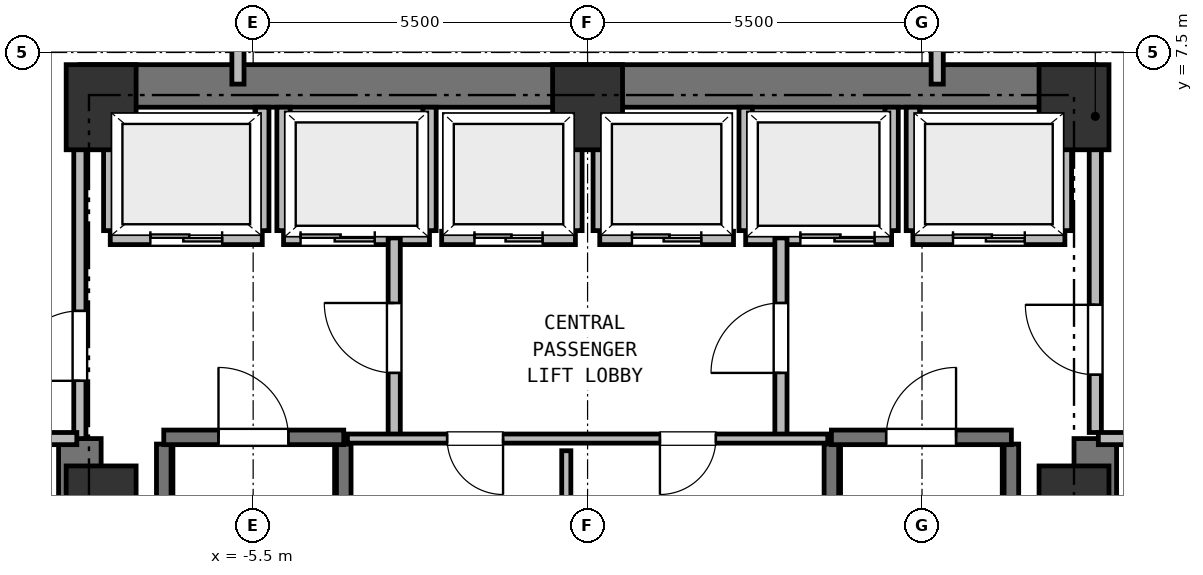
"""IFC4 building model, lengths in metres.
Left out: names, types, materials, properties, quantities, classifications, styles, units other than length and angle.
Written with IfcOpenShell. Run it as: python <this file> out.ifc"""

import sys

from ifc_helpers import new_model, si_unit, direction, frame, frame_2d, origin, origin_2d, place, context, subcontext, project, spatial, rectangle, extrude, element, fill, save


model = new_model("IFC4")
c1 = context("Model", 3, precision=1e-05, world=origin(), true_north=direction((0.0, 1.0)))
c2 = subcontext(c1, "Body", "Model", "MODEL_VIEW")
j1 = project(units=[si_unit("LENGTHUNIT", "METRE"), si_unit("PLANEANGLEUNIT", "RADIAN")], contexts=[c1])
p1 = place(None, origin())
s1 = spatial("IfcSite", under=j1, at=p1, CompositionType="ELEMENT")
p2 = place(p1, origin())
s2 = spatial("IfcBuilding", under=s1, at=p2, CompositionType="ELEMENT")
p3 = place(p2, origin())
s3 = spatial("IfcBuildingStorey", under=s2, at=p3, CompositionType="ELEMENT", Elevation=0.0)
for number, where, z_axis, x_axis in (
    (1, (8.0, 0.0, 0.0), (0.0, 0.0, 1.0), (1.0, 0.0, 0.0)),
    (2, (8.0, 6.6, 0.0), (0.0, 0.0, 1.0), (1.0, 0.0, 0.0)),
    (3, (0.0, 6.6, 0.0), (0.0, 0.0, 1.0), (1.0, 0.0, 0.0)),
    (4, (-8.0, 6.6, 0.0), (0.0, 0.0, 1.0), (1.0, 0.0, 0.0)),
    (5, (-8.0, 0.0, 0.0), (0.0, 0.0, 1.0), (1.0, 0.0, 0.0)),
):
    element("IfcColumn", number, at=place(p3, frame(where, z_axis=z_axis, x_axis=x_axis)), inside=s3, PredefinedType="COLUMN", context=c2, shape_type="SweptSolid", body=[
        extrude(rectangle(XDim=1.15, YDim=1.4, at=origin_2d()), origin(), (0.0, 0.0, 1.0), 6.0),
    ])
p4 = place(p3, frame((-8.35, 6.95, 0.0), z_axis=(0.0, 0.0, 1.0), x_axis=(1.0, 0.0, 0.0)))
e6 = element("IfcWall", 6, at=p4, inside=s3, PredefinedType="SHEAR", context=c2, shape_type="SweptSolid", body=[
    extrude(rectangle(XDim=16.7, YDim=0.7, at=frame_2d((8.35, 0.0))), origin(), (0.0, 0.0, 1.0), 5.72),
])
for number, where, z_axis, x_axis in (
    (7, (-8.35, -6.95, 0.0), (0.0, 0.0, 1.0), (0.0, 1.0, 0.0)),
    (8, (8.35, -6.95, 0.0), (0.0, 0.0, 1.0), (0.0, 1.0, 0.0)),
):
    element("IfcWall", number, at=place(p3, frame(where, z_axis=z_axis, x_axis=x_axis)), inside=s3, PredefinedType="SHEAR", context=c2, shape_type="SweptSolid", body=[
        extrude(rectangle(XDim=8.1, YDim=0.7, at=frame_2d((4.05, 0.0))), origin(), (0.0, 0.0, 1.0), 5.72),
    ])
for number, where, z_axis, x_axis in (
    (9, (-6.97, -6.16, 0.0), (0.0, 0.0, 1.0), (0.0, 1.0, 0.0)),
    (10, (-4.01, -6.16, 0.0), (0.0, 0.0, 1.0), (0.0, 1.0, 0.0)),
):
    element("IfcWall", number, at=place(p3, frame(where, z_axis=z_axis, x_axis=x_axis)), inside=s3, PredefinedType="SHEAR", context=c2, shape_type="SweptSolid", body=[
        extrude(rectangle(XDim=7.22, YDim=0.24, at=frame_2d((3.61, 0.0))), origin(), (0.0, 0.0, 1.0), 5.72),
    ])
p5 = place(p3, frame((-6.97, 1.17, 0.0), z_axis=(0.0, 0.0, 1.0), x_axis=(1.0, 0.0, 0.0)))
e11 = element("IfcWall", 11, at=p5, inside=s3, PredefinedType="SHEAR", context=c2, shape_type="SweptSolid", body=[
    extrude(rectangle(XDim=2.96, YDim=0.24, at=frame_2d((1.48, 0.0))), origin(), (0.0, 0.0, 1.0), 5.72),
])
p6 = place(p5, frame((0.9, 0.0, 0.0)))
e12 = element("IfcOpeningElement", 12, at=p6, cuts=e11, PredefinedType="OPENING", context=c2, shape_type="SweptSolid", body=[
    extrude(rectangle(XDim=1.15, YDim=2.15, at=frame_2d((0.575, 1.075))), frame((0.0, 0.13, 0.0), z_axis=(0.0, -1.0, 0.0), x_axis=(1.0, 0.0, 0.0)), (0.0, 0.0, 1.0), 0.26),
])
for number, where, z_axis, x_axis in (
    (13, (4.01, -6.16, 0.0), (0.0, 0.0, 1.0), (0.0, 1.0, 0.0)),
    (14, (6.97, -6.16, 0.0), (0.0, 0.0, 1.0), (0.0, 1.0, 0.0)),
):
    element("IfcWall", number, at=place(p3, frame(where, z_axis=z_axis, x_axis=x_axis)), inside=s3, PredefinedType="SHEAR", context=c2, shape_type="SweptSolid", body=[
        extrude(rectangle(XDim=7.22, YDim=0.24, at=frame_2d((3.61, 0.0))), origin(), (0.0, 0.0, 1.0), 5.72),
    ])
p7 = place(p3, frame((4.01, 1.17, 0.0), z_axis=(0.0, 0.0, 1.0), x_axis=(1.0, 0.0, 0.0)))
e15 = element("IfcWall", 15, at=p7, inside=s3, PredefinedType="SHEAR", context=c2, shape_type="SweptSolid", body=[
    extrude(rectangle(XDim=2.96, YDim=0.24, at=frame_2d((1.48, 0.0))), origin(), (0.0, 0.0, 1.0), 5.72),
])
p8 = place(p7, frame((0.9, 0.0, 0.0)))
e16 = element("IfcOpeningElement", 16, at=p8, cuts=e15, PredefinedType="OPENING", context=c2, shape_type="SweptSolid", body=[
    extrude(rectangle(XDim=1.15, YDim=2.15, at=frame_2d((0.575, 1.075))), frame((0.0, 0.13, 0.0), z_axis=(0.0, -1.0, 0.0), x_axis=(1.0, 0.0, 0.0)), (0.0, 0.0, 1.0), 0.26),
])
p9 = place(p3, frame((-7.85, 4.45, 0.0), z_axis=(0.0, 0.0, 1.0), x_axis=(1.0, 0.0, 0.0)))
e17 = element("IfcWall", 17, at=p9, inside=s3, PredefinedType="PARTITIONING", context=c2, shape_type="SweptSolid", body=[
    extrude(rectangle(XDim=2.5, YDim=0.22, at=frame_2d((1.25, 0.0))), origin(), (0.0, 0.0, 1.0), 5.72),
])
p10 = place(p9, frame((0.66, 0.0, 0.0)))
e18 = element("IfcOpeningElement", 18, at=p10, cuts=e17, PredefinedType="OPENING", context=c2, shape_type="SweptSolid", body=[
    extrude(rectangle(XDim=1.18, YDim=2.15, at=frame_2d((0.59, 1.075))), frame((0.0, 0.12, 0.0), z_axis=(0.0, -1.0, 0.0), x_axis=(1.0, 0.0, 0.0)), (0.0, 0.0, 1.0), 0.24),
])
p11 = place(p3, frame((-7.85, 4.57, 0.0), z_axis=(0.0, 0.0, 1.0), x_axis=(0.0, 1.0, 0.0)))
e19 = element("IfcWall", 19, at=p11, inside=s3, PredefinedType="PARTITIONING", context=c2, shape_type="SweptSolid", body=[
    extrude(rectangle(XDim=2.03, YDim=0.22, at=frame_2d((1.015, 0.0))), origin(), (0.0, 0.0, 1.0), 5.3),
])
p12 = place(p3, frame((-5.35, 4.57, 0.0), z_axis=(0.0, 0.0, 1.0), x_axis=(0.0, 1.0, 0.0)))
e20 = element("IfcWall", 20, at=p12, inside=s3, PredefinedType="PARTITIONING", context=c2, shape_type="SweptSolid", body=[
    extrude(rectangle(XDim=2.03, YDim=0.22, at=frame_2d((1.015, 0.0))), origin(), (0.0, 0.0, 1.0), 5.72),
])
p13 = place(p3, frame((5.35, 4.45, 0.0), z_axis=(0.0, 0.0, 1.0), x_axis=(1.0, 0.0, 0.0)))
e21 = element("IfcWall", 21, at=p13, inside=s3, PredefinedType="PARTITIONING", context=c2, shape_type="SweptSolid", body=[
    extrude(rectangle(XDim=2.5, YDim=0.22, at=frame_2d((1.25, 0.0))), origin(), (0.0, 0.0, 1.0), 5.72),
])
p14 = place(p13, frame((0.66, 0.0, 0.0)))
e22 = element("IfcOpeningElement", 22, at=p14, cuts=e21, PredefinedType="OPENING", context=c2, shape_type="SweptSolid", body=[
    extrude(rectangle(XDim=1.18, YDim=2.15, at=frame_2d((0.59, 1.075))), frame((0.0, 0.12, 0.0), z_axis=(0.0, -1.0, 0.0), x_axis=(1.0, 0.0, 0.0)), (0.0, 0.0, 1.0), 0.24),
])
p15 = place(p3, frame((5.35, 4.57, 0.0), z_axis=(0.0, 0.0, 1.0), x_axis=(0.0, 1.0, 0.0)))
e23 = element("IfcWall", 23, at=p15, inside=s3, PredefinedType="PARTITIONING", context=c2, shape_type="SweptSolid", body=[
    extrude(rectangle(XDim=2.03, YDim=0.22, at=frame_2d((1.015, 0.0))), origin(), (0.0, 0.0, 1.0), 5.72),
])
p16 = place(p3, frame((7.85, 4.57, 0.0), z_axis=(0.0, 0.0, 1.0), x_axis=(0.0, 1.0, 0.0)))
e24 = element("IfcWall", 24, at=p16, inside=s3, PredefinedType="PARTITIONING", context=c2, shape_type="SweptSolid", body=[
    extrude(rectangle(XDim=2.03, YDim=0.22, at=frame_2d((1.015, 0.0))), origin(), (0.0, 0.0, 1.0), 5.3),
])
p17 = place(p3, frame((-5.0, 4.45, 0.0), z_axis=(0.0, 0.0, 1.0), x_axis=(1.0, 0.0, 0.0)))
e25 = element("IfcWall", 25, at=p17, inside=s3, PredefinedType="PARTITIONING", context=c2, shape_type="SweptSolid", body=[
    extrude(rectangle(XDim=2.4, YDim=0.22, at=frame_2d((1.2, 0.0))), origin(), (0.0, 0.0, 1.0), 5.72),
])
p18 = place(p17, frame((0.28, 0.0, 0.0)))
e26 = element("IfcOpeningElement", 26, at=p18, cuts=e25, PredefinedType="OPENING", context=c2, shape_type="SweptSolid", body=[
    extrude(rectangle(XDim=1.22, YDim=2.15, at=frame_2d((0.61, 1.075))), frame((0.0, 0.12, 0.0), z_axis=(0.0, -1.0, 0.0), x_axis=(1.0, 0.0, 0.0)), (0.0, 0.0, 1.0), 0.24),
])
for number, where, z_axis, x_axis in (
    (27, (-5.0, 4.57, 0.0), (0.0, 0.0, 1.0), (0.0, 1.0, 0.0)),
    (28, (-2.6, 4.57, 0.0), (0.0, 0.0, 1.0), (0.0, 1.0, 0.0)),
):
    element("IfcWall", number, at=place(p3, frame(where, z_axis=z_axis, x_axis=x_axis)), inside=s3, PredefinedType="PARTITIONING", context=c2, shape_type="SweptSolid", body=[
        extrude(rectangle(XDim=2.03, YDim=0.22, at=frame_2d((1.015, 0.0))), origin(), (0.0, 0.0, 1.0), 5.72),
    ])
p19 = place(p3, frame((2.6, 4.45, 0.0), z_axis=(0.0, 0.0, 1.0), x_axis=(1.0, 0.0, 0.0)))
e29 = element("IfcWall", 29, at=p19, inside=s3, PredefinedType="PARTITIONING", context=c2, shape_type="SweptSolid", body=[
    extrude(rectangle(XDim=2.4, YDim=0.22, at=frame_2d((1.2, 0.0))), origin(), (0.0, 0.0, 1.0), 5.72),
])
p20 = place(p19, frame((0.9, 0.0, 0.0)))
e30 = element("IfcOpeningElement", 30, at=p20, cuts=e29, PredefinedType="OPENING", context=c2, shape_type="SweptSolid", body=[
    extrude(rectangle(XDim=1.22, YDim=2.15, at=frame_2d((0.61, 1.075))), frame((0.0, 0.12, 0.0), z_axis=(0.0, -1.0, 0.0), x_axis=(1.0, 0.0, 0.0)), (0.0, 0.0, 1.0), 0.24),
])
for number, where, z_axis, x_axis in (
    (31, (2.6, 4.57, 0.0), (0.0, 0.0, 1.0), (0.0, 1.0, 0.0)),
    (32, (5.0, 4.57, 0.0), (0.0, 0.0, 1.0), (0.0, 1.0, 0.0)),
):
    element("IfcWall", number, at=place(p3, frame(where, z_axis=z_axis, x_axis=x_axis)), inside=s3, PredefinedType="PARTITIONING", context=c2, shape_type="SweptSolid", body=[
        extrude(rectangle(XDim=2.03, YDim=0.22, at=frame_2d((1.015, 0.0))), origin(), (0.0, 0.0, 1.0), 5.72),
    ])
p21 = place(p3, frame((-2.4, 4.45, 0.0), z_axis=(0.0, 0.0, 1.0), x_axis=(1.0, 0.0, 0.0)))
e33 = element("IfcWall", 33, at=p21, inside=s3, PredefinedType="PARTITIONING", context=c2, shape_type="SweptSolid", body=[
    extrude(rectangle(XDim=2.2, YDim=0.22, at=frame_2d((1.1, 0.0))), origin(), (0.0, 0.0, 1.0), 5.72),
])
p22 = place(p21, frame((0.54, 0.0, 0.0)))
e34 = element("IfcOpeningElement", 34, at=p22, cuts=e33, PredefinedType="OPENING", context=c2, shape_type="SweptSolid", body=[
    extrude(rectangle(XDim=1.12, YDim=2.15, at=frame_2d((0.56, 1.075))), frame((0.0, 0.12, 0.0), z_axis=(0.0, -1.0, 0.0), x_axis=(1.0, 0.0, 0.0)), (0.0, 0.0, 1.0), 0.24),
])
p23 = place(p3, frame((-0.2, 4.57, 0.0), z_axis=(0.0, 0.0, 1.0), x_axis=(0.0, 1.0, 0.0)))
e35 = element("IfcWall", 35, at=p23, inside=s3, PredefinedType="PARTITIONING", context=c2, shape_type="SweptSolid", body=[
    extrude(rectangle(XDim=2.03, YDim=0.22, at=frame_2d((1.015, 0.0))), origin(), (0.0, 0.0, 1.0), 5.72),
])
p24 = place(p3, frame((0.2, 4.45, 0.0), z_axis=(0.0, 0.0, 1.0), x_axis=(1.0, 0.0, 0.0)))
e36 = element("IfcWall", 36, at=p24, inside=s3, PredefinedType="PARTITIONING", context=c2, shape_type="SweptSolid", body=[
    extrude(rectangle(XDim=2.2, YDim=0.22, at=frame_2d((1.1, 0.0))), origin(), (0.0, 0.0, 1.0), 5.72),
])
p25 = place(p24, frame((0.53, 0.0, 0.0)))
e37 = element("IfcOpeningElement", 37, at=p25, cuts=e36, PredefinedType="OPENING", context=c2, shape_type="SweptSolid", body=[
    extrude(rectangle(XDim=1.14, YDim=2.15, at=frame_2d((0.57, 1.075))), frame((0.0, 0.12, 0.0), z_axis=(0.0, -1.0, 0.0), x_axis=(1.0, 0.0, 0.0)), (0.0, 0.0, 1.0), 0.24),
])
p26 = place(p3, frame((0.2, 4.57, 0.0), z_axis=(0.0, 0.0, 1.0), x_axis=(0.0, 1.0, 0.0)))
e38 = element("IfcWall", 38, at=p26, inside=s3, PredefinedType="PARTITIONING", context=c2, shape_type="SweptSolid", body=[
    extrude(rectangle(XDim=2.03, YDim=0.22, at=frame_2d((1.015, 0.0))), origin(), (0.0, 0.0, 1.0), 5.72),
])
p27 = place(p3, frame((-3.18, 1.15, 0.0), z_axis=(0.0, 0.0, 1.0), x_axis=(0.0, 1.0, 0.0)))
e39 = element("IfcWall", 39, at=p27, inside=s3, PredefinedType="PARTITIONING", context=c2, shape_type="SweptSolid", body=[
    extrude(rectangle(XDim=3.3, YDim=0.2, at=frame_2d((1.65, 0.0))), origin(), (0.0, 0.0, 1.0), 5.72),
])
p28 = place(p27, frame((1.08, 0.0, 0.0)))
e40 = element("IfcOpeningElement", 40, at=p28, cuts=e39, PredefinedType="OPENING", context=c2, shape_type="SweptSolid", body=[
    extrude(rectangle(XDim=1.15, YDim=2.15, at=frame_2d((0.575, 1.075))), frame((0.0, 0.11, 0.0), z_axis=(0.0, -1.0, 0.0), x_axis=(1.0, 0.0, 0.0)), (0.0, 0.0, 1.0), 0.22),
])
p29 = place(p3, frame((3.18, 1.15, 0.0), z_axis=(0.0, 0.0, 1.0), x_axis=(0.0, 1.0, 0.0)))
e41 = element("IfcWall", 41, at=p29, inside=s3, PredefinedType="PARTITIONING", context=c2, shape_type="SweptSolid", body=[
    extrude(rectangle(XDim=3.3, YDim=0.2, at=frame_2d((1.65, 0.0))), origin(), (0.0, 0.0, 1.0), 5.72),
])
p30 = place(p29, frame((1.08, 0.0, 0.0)))
e42 = element("IfcOpeningElement", 42, at=p30, cuts=e41, PredefinedType="OPENING", context=c2, shape_type="SweptSolid", body=[
    extrude(rectangle(XDim=1.15, YDim=2.15, at=frame_2d((0.575, 1.075))), frame((0.0, 0.11, 0.0), z_axis=(0.0, -1.0, 0.0), x_axis=(1.0, 0.0, 0.0)), (0.0, 0.0, 1.0), 0.22),
])
p31 = place(p3, frame((-8.35, 1.15, 0.0), z_axis=(0.0, 0.0, 1.0), x_axis=(0.0, 1.0, 0.0)))
e43 = element("IfcWall", 43, at=p31, inside=s3, PredefinedType="PARTITIONING", context=c2, shape_type="SweptSolid", body=[
    extrude(rectangle(XDim=5.4, YDim=0.2, at=frame_2d((2.7, 0.0))), origin(), (0.0, 0.0, 1.0), 5.72),
])
p32 = place(p31, frame((0.95, 0.0, 0.0)))
e44 = element("IfcOpeningElement", 44, at=p32, cuts=e43, PredefinedType="OPENING", context=c2, shape_type="SweptSolid", body=[
    extrude(rectangle(XDim=1.15, YDim=2.15, at=frame_2d((0.575, 1.075))), frame((0.0, 0.11, 0.0), z_axis=(0.0, -1.0, 0.0), x_axis=(1.0, 0.0, 0.0)), (0.0, 0.0, 1.0), 0.22),
])
p33 = place(p3, frame((8.35, 1.25, 0.0), z_axis=(0.0, 0.0, 1.0), x_axis=(0.0, 1.0, 0.0)))
e45 = element("IfcWall", 45, at=p33, inside=s3, PredefinedType="PARTITIONING", context=c2, shape_type="SweptSolid", body=[
    extrude(rectangle(XDim=5.3, YDim=0.2, at=frame_2d((2.65, 0.0))), origin(), (0.0, 0.0, 1.0), 5.72),
])
p34 = place(p33, frame((0.95, 0.0, 0.0)))
e46 = element("IfcOpeningElement", 46, at=p34, cuts=e45, PredefinedType="OPENING", context=c2, shape_type="SweptSolid", body=[
    extrude(rectangle(XDim=1.15, YDim=2.15, at=frame_2d((0.575, 1.075))), frame((0.0, 0.11, 0.0), z_axis=(0.0, -1.0, 0.0), x_axis=(1.0, 0.0, 0.0)), (0.0, 0.0, 1.0), 0.22),
])
p35 = place(p3, frame((3.95, 1.15, 0.0), z_axis=(0.0, 0.0, 1.0), x_axis=(-1.0, 0.0, 0.0)))
e47 = element("IfcWall", 47, at=p35, inside=s3, PredefinedType="PARTITIONING", context=c2, shape_type="SweptSolid", body=[
    extrude(rectangle(XDim=7.9, YDim=0.15, at=frame_2d((3.95, 0.0))), origin(), (0.0, 0.0, 1.0), 5.72),
])
p36 = place(p35, frame((5.34, 0.0, 0.0)))
e48 = element("IfcOpeningElement", 48, at=p36, cuts=e47, PredefinedType="OPENING", context=c2, shape_type="SweptSolid", body=[
    extrude(rectangle(XDim=0.92, YDim=2.05, at=frame_2d((0.46, 1.025))), frame((0.0, 0.085, 0.0), z_axis=(0.0, -1.0, 0.0), x_axis=(1.0, 0.0, 0.0)), (0.0, 0.0, 1.0), 0.17),
])
p37 = place(p35, frame((1.84, 0.0, 0.0)))
e49 = element("IfcOpeningElement", 49, at=p37, cuts=e47, PredefinedType="OPENING", context=c2, shape_type="SweptSolid", body=[
    extrude(rectangle(XDim=0.92, YDim=2.05, at=frame_2d((0.46, 1.025))), frame((0.0, 0.085, 0.0), z_axis=(0.0, -1.0, 0.0), x_axis=(1.0, 0.0, 0.0)), (0.0, 0.0, 1.0), 0.17),
])
p38 = place(p3, frame((-0.35, -1.73, 0.0), z_axis=(0.0, 0.0, 1.0), x_axis=(0.0, 1.0, 0.0)))
e50 = element("IfcWall", 50, at=p38, inside=s3, PredefinedType="PARTITIONING", context=c2, shape_type="SweptSolid", body=[
    extrude(rectangle(XDim=2.68, YDim=0.15, at=frame_2d((1.34, 0.0))), origin(), (0.0, 0.0, 1.0), 5.72),
])
p39 = place(p3, frame((-5.75, 6.98, 0.0), z_axis=(0.0, 0.0, 1.0), x_axis=(0.0, 1.0, 0.0)))
e51 = element("IfcWall", 51, at=p39, inside=s3, PredefinedType="PARTITIONING", context=c2, shape_type="SweptSolid", body=[
    extrude(rectangle(XDim=3.27, YDim=0.2, at=frame_2d((1.635, 0.0))), origin(), (0.0, 0.0, 1.0), 5.72),
])
p40 = place(p3, frame((-10.65, 1.15, 0.0), z_axis=(0.0, 0.0, 1.0), x_axis=(1.0, 0.0, 0.0)))
e52 = element("IfcWall", 52, at=p40, inside=s3, PredefinedType="PARTITIONING", context=c2, shape_type="SweptSolid", body=[
    extrude(rectangle(XDim=2.25, YDim=0.2, at=frame_2d((1.125, 0.0))), origin(), (0.0, 0.0, 1.0), 5.72),
])
p41 = place(p40, frame((0.55, 0.0, 0.0)))
e53 = element("IfcOpeningElement", 53, at=p41, cuts=e52, PredefinedType="OPENING", context=c2, shape_type="SweptSolid", body=[
    extrude(rectangle(XDim=1.15, YDim=2.15, at=frame_2d((0.575, 1.075))), frame((0.0, 0.11, 0.0), z_axis=(0.0, -1.0, 0.0), x_axis=(1.0, 0.0, 0.0)), (0.0, 0.0, 1.0), 0.22),
])
p42 = place(p3, frame((5.75, 10.25, 0.0), z_axis=(0.0, 0.0, 1.0), x_axis=(0.0, -1.0, 0.0)))
e54 = element("IfcWall", 54, at=p42, inside=s3, PredefinedType="PARTITIONING", context=c2, shape_type="SweptSolid", body=[
    extrude(rectangle(XDim=3.27, YDim=0.2, at=frame_2d((1.635, 0.0))), origin(), (0.0, 0.0, 1.0), 5.72),
])
p43 = place(p3, frame((8.4, 1.15, 0.0), z_axis=(0.0, 0.0, 1.0), x_axis=(1.0, 0.0, 0.0)))
e55 = element("IfcWall", 55, at=p43, inside=s3, PredefinedType="PARTITIONING", context=c2, shape_type="SweptSolid", body=[
    extrude(rectangle(XDim=2.25, YDim=0.2, at=frame_2d((1.125, 0.0))), origin(), (0.0, 0.0, 1.0), 5.72),
])
p44 = place(p43, frame((0.55, 0.0, 0.0)))
e56 = element("IfcOpeningElement", 56, at=p44, cuts=e55, PredefinedType="OPENING", context=c2, shape_type="SweptSolid", body=[
    extrude(rectangle(XDim=1.15, YDim=2.15, at=frame_2d((0.575, 1.075))), frame((0.0, 0.11, 0.0), z_axis=(0.0, -1.0, 0.0), x_axis=(1.0, 0.0, 0.0)), (0.0, 0.0, 1.0), 0.22),
])
p45 = place(p6, origin())
e57 = element("IfcDoor", 57, at=p45, inside=s3, OperationType="SINGLE_SWING_LEFT", PredefinedType="DOOR", context=c2, shape_type="SweptSolid", body=[
    extrude(rectangle(XDim=1.15, YDim=2.15, at=frame_2d((0.575, 1.075))), frame((0.0, 0.025, 0.0), z_axis=(0.0, -1.0, 0.0), x_axis=(1.0, 0.0, 0.0)), (0.0, 0.0, 1.0), 0.05),
])
fill(e12, e57)
p46 = place(p8, origin())
e58 = element("IfcDoor", 58, at=p46, inside=s3, OperationType="SINGLE_SWING_RIGHT", PredefinedType="DOOR", context=c2, shape_type="SweptSolid", body=[
    extrude(rectangle(XDim=1.15, YDim=2.15, at=frame_2d((0.575, 1.075))), frame((0.0, 0.025, 0.0), z_axis=(0.0, -1.0, 0.0), x_axis=(1.0, 0.0, 0.0)), (0.0, 0.0, 1.0), 0.05),
])
fill(e16, e58)
p47 = place(p10, origin())
e59 = element("IfcDoor", 59, at=p47, inside=s3, OperationType="DOUBLE_DOOR_SLIDING", PredefinedType="DOOR", context=c2, shape_type="SweptSolid", body=[
    extrude(rectangle(XDim=1.18, YDim=2.15, at=frame_2d((0.59, 1.075))), frame((0.0, 0.025, 0.0), z_axis=(0.0, -1.0, 0.0), x_axis=(1.0, 0.0, 0.0)), (0.0, 0.0, 1.0), 0.05),
])
fill(e18, e59)
p48 = place(p14, origin())
e60 = element("IfcDoor", 60, at=p48, inside=s3, OperationType="DOUBLE_DOOR_SLIDING", PredefinedType="DOOR", context=c2, shape_type="SweptSolid", body=[
    extrude(rectangle(XDim=1.18, YDim=2.15, at=frame_2d((0.59, 1.075))), frame((0.0, 0.025, 0.0), z_axis=(0.0, -1.0, 0.0), x_axis=(1.0, 0.0, 0.0)), (0.0, 0.0, 1.0), 0.05),
])
fill(e22, e60)
p49 = place(p18, origin())
e61 = element("IfcDoor", 61, at=p49, inside=s3, OperationType="DOUBLE_DOOR_SLIDING", PredefinedType="DOOR", context=c2, shape_type="SweptSolid", body=[
    extrude(rectangle(XDim=1.22, YDim=2.15, at=frame_2d((0.61, 1.075))), frame((0.0, 0.025, 0.0), z_axis=(0.0, -1.0, 0.0), x_axis=(1.0, 0.0, 0.0)), (0.0, 0.0, 1.0), 0.05),
])
fill(e26, e61)
p50 = place(p20, origin())
e62 = element("IfcDoor", 62, at=p50, inside=s3, OperationType="DOUBLE_DOOR_SLIDING", PredefinedType="DOOR", context=c2, shape_type="SweptSolid", body=[
    extrude(rectangle(XDim=1.22, YDim=2.15, at=frame_2d((0.61, 1.075))), frame((0.0, 0.025, 0.0), z_axis=(0.0, -1.0, 0.0), x_axis=(1.0, 0.0, 0.0)), (0.0, 0.0, 1.0), 0.05),
])
fill(e30, e62)
p51 = place(p22, origin())
e63 = element("IfcDoor", 63, at=p51, inside=s3, OperationType="DOUBLE_DOOR_SLIDING", PredefinedType="DOOR", context=c2, shape_type="SweptSolid", body=[
    extrude(rectangle(XDim=1.12, YDim=2.15, at=frame_2d((0.56, 1.075))), frame((0.0, 0.025, 0.0), z_axis=(0.0, -1.0, 0.0), x_axis=(1.0, 0.0, 0.0)), (0.0, 0.0, 1.0), 0.05),
])
fill(e34, e63)
p52 = place(p25, origin())
e64 = element("IfcDoor", 64, at=p52, inside=s3, OperationType="DOUBLE_DOOR_SLIDING", PredefinedType="DOOR", context=c2, shape_type="SweptSolid", body=[
    extrude(rectangle(XDim=1.14, YDim=2.15, at=frame_2d((0.57, 1.075))), frame((0.0, 0.025, 0.0), z_axis=(0.0, -1.0, 0.0), x_axis=(1.0, 0.0, 0.0)), (0.0, 0.0, 1.0), 0.05),
])
fill(e37, e64)
p53 = place(p28, origin())
e65 = element("IfcDoor", 65, at=p53, inside=s3, OperationType="SINGLE_SWING_RIGHT", PredefinedType="DOOR", context=c2, shape_type="SweptSolid", body=[
    extrude(rectangle(XDim=1.15, YDim=2.15, at=frame_2d((0.575, 1.075))), frame((0.0, 0.025, 0.0), z_axis=(0.0, -1.0, 0.0), x_axis=(1.0, 0.0, 0.0)), (0.0, 0.0, 1.0), 0.05),
])
fill(e40, e65)
p54 = place(p30, origin())
e66 = element("IfcDoor", 66, at=p54, inside=s3, OperationType="SINGLE_SWING_LEFT", PredefinedType="DOOR", context=c2, shape_type="SweptSolid", body=[
    extrude(rectangle(XDim=1.15, YDim=2.15, at=frame_2d((0.575, 1.075))), frame((0.0, 0.025, 0.0), z_axis=(0.0, -1.0, 0.0), x_axis=(1.0, 0.0, 0.0)), (0.0, 0.0, 1.0), 0.05),
])
fill(e42, e66)
p55 = place(p32, origin())
e67 = element("IfcDoor", 67, at=p55, inside=s3, OperationType="SINGLE_SWING_LEFT", PredefinedType="DOOR", context=c2, shape_type="SweptSolid", body=[
    extrude(rectangle(XDim=1.15, YDim=2.15, at=frame_2d((0.575, 1.075))), frame((0.0, 0.025, 0.0), z_axis=(0.0, -1.0, 0.0), x_axis=(1.0, 0.0, 0.0)), (0.0, 0.0, 1.0), 0.05),
])
fill(e44, e67)
p56 = place(p34, origin())
e68 = element("IfcDoor", 68, at=p56, inside=s3, OperationType="SINGLE_SWING_RIGHT", PredefinedType="DOOR", context=c2, shape_type="SweptSolid", body=[
    extrude(rectangle(XDim=1.15, YDim=2.15, at=frame_2d((0.575, 1.075))), frame((0.0, 0.025, 0.0), z_axis=(0.0, -1.0, 0.0), x_axis=(1.0, 0.0, 0.0)), (0.0, 0.0, 1.0), 0.05),
])
fill(e46, e68)
p57 = place(p36, origin())
e69 = element("IfcDoor", 69, at=p57, inside=s3, OperationType="SINGLE_SWING_LEFT", PredefinedType="DOOR", context=c2, shape_type="SweptSolid", body=[
    extrude(rectangle(XDim=0.92, YDim=2.05, at=frame_2d((0.46, 1.025))), frame((0.0, 0.025, 0.0), z_axis=(0.0, -1.0, 0.0), x_axis=(1.0, 0.0, 0.0)), (0.0, 0.0, 1.0), 0.05),
])
fill(e48, e69)
p58 = place(p37, origin())
e70 = element("IfcDoor", 70, at=p58, inside=s3, OperationType="SINGLE_SWING_RIGHT", PredefinedType="DOOR", context=c2, shape_type="SweptSolid", body=[
    extrude(rectangle(XDim=0.92, YDim=2.05, at=frame_2d((0.46, 1.025))), frame((0.0, 0.025, 0.0), z_axis=(0.0, -1.0, 0.0), x_axis=(1.0, 0.0, 0.0)), (0.0, 0.0, 1.0), 0.05),
])
fill(e49, e70)
save(model, sys.argv[1])
